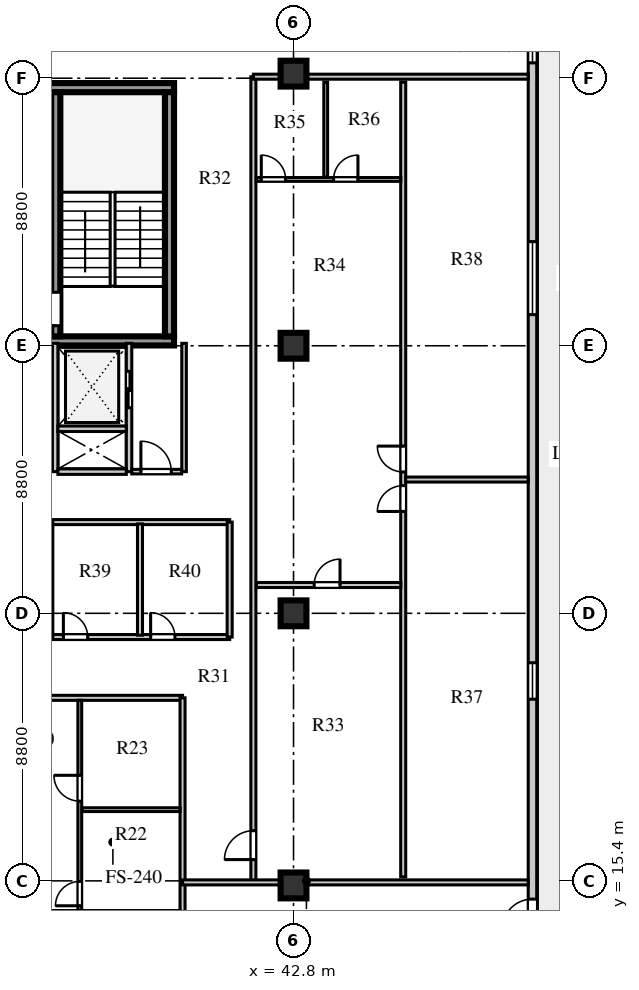
"""IFC4 building model, lengths in metres.
Left out: names, types, materials, properties, quantities, classifications, styles, units other than length and angle.
Written with IfcOpenShell. Run it as: python <this file> out.ifc"""

import sys

from ifc_helpers import new_model, si_unit, direction, frame, frame_2d, origin, origin_2d, place, context, subcontext, project, spatial, rectangle, extrude, element, fill, save


model = new_model("IFC4")
c1 = context("Model", 3, precision=1e-05, world=origin(), true_north=direction((0.0, 1.0)))
c2 = subcontext(c1, "Body", "Model", "MODEL_VIEW")
j1 = project(units=[si_unit("LENGTHUNIT", "METRE"), si_unit("PLANEANGLEUNIT", "RADIAN")], contexts=[c1])
p1 = place(None, origin())
s1 = spatial("IfcSite", under=j1, at=p1, CompositionType="ELEMENT")
p2 = place(p1, origin())
s2 = spatial("IfcBuilding", under=s1, at=p2, CompositionType="ELEMENT")
p3 = place(p2, frame((0.0, 0.0, 253.1)))
s3 = spatial("IfcBuildingStorey", under=s2, at=p3, CompositionType="ELEMENT", Elevation=253.1)
for number, where, z_axis, x_axis in (
    (1, (34.225, 33.16, 0.0), (0.0, 0.0, 1.0), (1.0, 0.0, 0.0)),
    (2, (34.225, 41.49, 0.0), (0.0, 0.0, 1.0), (1.0, 0.0, 0.0)),
):
    element("IfcWall", number, at=place(p3, frame(where, z_axis=z_axis, x_axis=x_axis)), inside=s3, PredefinedType="SHEAR", context=c2, shape_type="SweptSolid", body=[
        extrude(rectangle(XDim=4.645, YDim=0.3, at=frame_2d((2.323, 0.0))), origin(), (0.0, 0.0, 1.0), 3.66),
    ])
p4 = place(p3, frame((34.98, 33.31, 0.0), z_axis=(0.0, 0.0, 1.0), x_axis=(0.0, 1.0, 0.0)))
e3 = element("IfcWall", 3, at=p4, inside=s3, PredefinedType="SHEAR", context=c2, shape_type="SweptSolid", body=[
    extrude(rectangle(XDim=8.03, YDim=0.3, at=frame_2d((4.015, 0.0))), origin(), (0.0, 0.0, 1.0), 3.66),
])
p5 = place(p4, frame((0.35, 0.0, 0.0)))
e4 = element("IfcOpeningElement", 4, at=p5, cuts=e3, PredefinedType="OPENING", context=c2, shape_type="SweptSolid", body=[
    extrude(rectangle(XDim=1.1, YDim=2.1, at=frame_2d((0.55, 1.05))), frame((0.0, 0.16, 0.0), z_axis=(0.0, -1.0, 0.0), x_axis=(1.0, 0.0, 0.0)), (0.0, 0.0, 1.0), 0.32),
])
p6 = place(p3, frame((38.72, 33.31, 0.0), z_axis=(0.0, 0.0, 1.0), x_axis=(0.0, 1.0, 0.0)))
e5 = element("IfcWall", 5, at=p6, inside=s3, PredefinedType="SHEAR", context=c2, shape_type="SweptSolid", body=[
    extrude(rectangle(XDim=8.03, YDim=0.3, at=frame_2d((4.015, 0.0))), origin(), (0.0, 0.0, 1.0), 3.66),
])
for number, where, z_axis, x_axis in (
    (6, (42.8, 15.25, 0.0), (0.0, 0.0, 1.0), (1.0, 0.0, 0.0)),
    (7, (42.8, 24.2, 0.0), (0.0, 0.0, 1.0), (1.0, 0.0, 0.0)),
    (8, (42.8, 33.0, 0.0), (0.0, 0.0, 1.0), (1.0, 0.0, 0.0)),
    (9, (42.8, 41.95, 0.0), (0.0, 0.0, 1.0), (1.0, 0.0, 0.0)),
):
    element("IfcColumn", number, at=place(p3, frame(where, z_axis=z_axis, x_axis=x_axis)), inside=s3, PredefinedType="COLUMN", context=c2, shape_type="SweptSolid", body=[
        extrude(rectangle(XDim=0.85, YDim=0.85, at=origin_2d()), origin(), (0.0, 0.0, 1.0), 3.66),
    ])
p7 = place(p3, frame((50.66, 13.13, 0.0), z_axis=(0.0, 0.0, 1.0), x_axis=(0.0, 1.0, 0.0)))
e10 = element("IfcWall", 10, at=p7, inside=s3, PredefinedType="STANDARD", context=c2, shape_type="SweptSolid", body=[
    extrude(rectangle(XDim=30.94, YDim=0.28, at=frame_2d((15.47, 0.0))), origin(), (0.0, 0.0, 1.0), 3.66),
])
p8 = place(p7, frame((0.67, 0.0, 0.0)))
e11 = element("IfcOpeningElement", 11, at=p8, cuts=e10, PredefinedType="OPENING", context=c2, shape_type="SweptSolid", body=[
    extrude(rectangle(XDim=1.0, YDim=2.05, at=frame_2d((0.5, 1.025))), frame((0.0, 0.15, 0.0), z_axis=(0.0, -1.0, 0.0), x_axis=(1.0, 0.0, 0.0)), (0.0, 0.0, 1.0), 0.3),
])
p9 = place(p7, frame((8.245, 0.0, 0.8)))
e12 = element("IfcOpeningElement", 12, at=p9, cuts=e10, PredefinedType="OPENING", context=c2, shape_type="SweptSolid", body=[
    extrude(rectangle(XDim=1.2, YDim=1.75, at=frame_2d((0.6, 0.875))), frame((0.0, 0.15, 0.0), z_axis=(0.0, -1.0, 0.0), x_axis=(1.0, 0.0, 0.0)), (0.0, 0.0, 1.0), 0.3),
])
p10 = place(p7, frame((20.895, 0.0, 0.8)))
e13 = element("IfcOpeningElement", 13, at=p10, cuts=e10, PredefinedType="OPENING", context=c2, shape_type="SweptSolid", body=[
    extrude(rectangle(XDim=2.4, YDim=2.05, at=frame_2d((1.2, 1.025))), frame((0.0, 0.15, 0.0), z_axis=(0.0, -1.0, 0.0), x_axis=(1.0, 0.0, 0.0)), (0.0, 0.0, 1.0), 0.3),
])
p11 = place(p7, frame((29.175, 0.0, 0.8)))
e14 = element("IfcOpeningElement", 14, at=p11, cuts=e10, PredefinedType="OPENING", context=c2, shape_type="SweptSolid", body=[
    extrude(rectangle(XDim=1.2, YDim=1.75, at=frame_2d((0.6, 0.875))), frame((0.0, 0.15, 0.0), z_axis=(0.0, -1.0, 0.0), x_axis=(1.0, 0.0, 0.0)), (0.0, 0.0, 1.0), 0.3),
])
p12 = place(p3, frame((34.96, 28.86, 0.0), z_axis=(0.0, 0.0, 1.0), x_axis=(0.0, 1.0, 0.0)))
e15 = element("IfcWall", 15, at=p12, inside=s3, PredefinedType="SOLIDWALL", context=c2, shape_type="SweptSolid", body=[
    extrude(rectangle(XDim=4.22, YDim=0.18, at=frame_2d((2.11, 0.0))), origin(), (0.0, 0.0, 1.0), 3.66),
])
p13 = place(p3, frame((37.39, 28.86, 0.0), z_axis=(0.0, 0.0, 1.0), x_axis=(0.0, 1.0, 0.0)))
e16 = element("IfcWall", 16, at=p13, inside=s3, PredefinedType="SOLIDWALL", context=c2, shape_type="SweptSolid", body=[
    extrude(rectangle(XDim=4.22, YDim=0.18, at=frame_2d((2.11, 0.0))), origin(), (0.0, 0.0, 1.0), 3.66),
])
p14 = place(p13, frame((2.1, 0.0, 0.0)))
e17 = element("IfcOpeningElement", 17, at=p14, cuts=e16, PredefinedType="OPENING", context=c2, shape_type="SweptSolid", body=[
    extrude(rectangle(XDim=1.2, YDim=2.12, at=frame_2d((0.6, 1.06))), frame((0.0, 0.1, 0.0), z_axis=(0.0, -1.0, 0.0), x_axis=(1.0, 0.0, 0.0)), (0.0, 0.0, 1.0), 0.2),
])
for number, where, z_axis, x_axis in (
    (18, (35.05, 28.86, 0.0), (0.0, 0.0, 1.0), (1.0, 0.0, 0.0)),
    (19, (35.05, 30.27, 0.0), (0.0, 0.0, 1.0), (1.0, 0.0, 0.0)),
):
    element("IfcWall", number, at=place(p3, frame(where, z_axis=z_axis, x_axis=x_axis)), inside=s3, PredefinedType="SOLIDWALL", context=c2, shape_type="SweptSolid", body=[
        extrude(rectangle(XDim=2.25, YDim=0.18, at=frame_2d((1.125, 0.0))), origin(), (0.0, 0.0, 1.0), 3.66),
    ])
p15 = place(p3, frame((39.2, 28.86, 0.0), z_axis=(0.0, 0.0, 1.0), x_axis=(0.0, 1.0, 0.0)))
e20 = element("IfcWall", 20, at=p15, inside=s3, PredefinedType="PARTITIONING", context=c2, shape_type="SweptSolid", body=[
    extrude(rectangle(XDim=4.22, YDim=0.15, at=frame_2d((2.11, 0.0))), origin(), (0.0, 0.0, 1.0), 3.66),
])
p16 = place(p3, frame((37.48, 28.86, 0.0), z_axis=(0.0, 0.0, 1.0), x_axis=(1.0, 0.0, 0.0)))
e21 = element("IfcWall", 21, at=p16, inside=s3, PredefinedType="PARTITIONING", context=c2, shape_type="SweptSolid", body=[
    extrude(rectangle(XDim=1.64, YDim=0.15, at=frame_2d((0.82, 0.0))), origin(), (0.0, 0.0, 1.0), 3.66),
])
p17 = place(p16, frame((0.3, 0.0, 0.0)))
e22 = element("IfcOpeningElement", 22, at=p17, cuts=e21, PredefinedType="OPENING", context=c2, shape_type="SweptSolid", body=[
    extrude(rectangle(XDim=1.0, YDim=2.1, at=frame_2d((0.5, 1.05))), frame((0.0, 0.085, 0.0), z_axis=(0.0, -1.0, 0.0), x_axis=(1.0, 0.0, 0.0)), (0.0, 0.0, 1.0), 0.17),
])
p18 = place(p3, frame((27.08, 21.42, 0.0), z_axis=(0.0, 0.0, 1.0), x_axis=(1.0, 0.0, 0.0)))
e23 = element("IfcWall", 23, at=p18, inside=s3, PredefinedType="PARTITIONING", context=c2, shape_type="SweptSolid", body=[
    extrude(rectangle(XDim=12.07, YDim=0.165, at=frame_2d((6.035, 0.0))), origin(), (0.0, 0.0, 1.0), 3.31),
])
p19 = place(p18, frame((0.63, 0.0, 0.0)))
e24 = element("IfcOpeningElement", 24, at=p19, cuts=e23, PredefinedType="OPENING", context=c2, shape_type="SweptSolid", body=[
    extrude(rectangle(XDim=0.95, YDim=2.1, at=frame_2d((0.475, 1.05))), frame((0.0, 0.093, 0.0), z_axis=(0.0, -1.0, 0.0), x_axis=(1.0, 0.0, 0.0)), (0.0, 0.0, 1.0), 0.185),
])
p20 = place(p3, frame((39.15, 7.88, 0.0), z_axis=(0.0, 0.0, 1.0), x_axis=(0.0, 1.0, 0.0)))
e25 = element("IfcWall", 25, at=p20, inside=s3, PredefinedType="PARTITIONING", context=c2, shape_type="SweptSolid", body=[
    extrude(rectangle(XDim=13.54, YDim=0.165, at=frame_2d((6.77, 0.0))), origin(), (0.0, 0.0, 1.0), 3.66),
])
p21 = place(p3, frame((35.77, 14.421, 0.0), z_axis=(0.0, 0.0, 1.0), x_axis=(0.0, 1.0, 0.0)))
e26 = element("IfcWall", 26, at=p21, inside=s3, PredefinedType="PLUMBINGWALL", context=c2, shape_type="SweptSolid", body=[
    extrude(rectangle(XDim=6.919, YDim=0.125, at=frame_2d((3.459, 0.0))), origin(), (0.0, 0.0, 1.0), 3.66),
])
p22 = place(p21, frame((0.16, 0.0, 0.0)))
e27 = element("IfcOpeningElement", 27, at=p22, cuts=e26, PredefinedType="OPENING", context=c2, shape_type="SweptSolid", body=[
    extrude(rectangle(XDim=0.8, YDim=2.05, at=frame_2d((0.4, 1.025))), frame((0.0, 0.073, 0.0), z_axis=(0.0, -1.0, 0.0), x_axis=(1.0, 0.0, 0.0)), (0.0, 0.0, 1.0), 0.145),
])
p23 = place(p21, frame((3.601, 0.0, 0.0)))
e28 = element("IfcOpeningElement", 28, at=p23, cuts=e26, PredefinedType="OPENING", context=c2, shape_type="SweptSolid", body=[
    extrude(rectangle(XDim=0.85, YDim=2.08, at=frame_2d((0.425, 1.04))), frame((0.0, 0.073, 0.0), z_axis=(0.0, -1.0, 0.0), x_axis=(1.0, 0.0, 0.0)), (0.0, 0.0, 1.0), 0.145),
])
p24 = place(p3, frame((35.85, 17.742, 0.0), z_axis=(0.0, 0.0, 1.0), x_axis=(1.0, 0.0, 0.0)))
e29 = element("IfcWall", 29, at=p24, inside=s3, PredefinedType="PLUMBINGWALL", context=c2, shape_type="SweptSolid", body=[
    extrude(rectangle(XDim=3.22, YDim=0.125, at=frame_2d((1.61, 0.0))), origin(), (0.0, 0.0, 1.0), 3.66),
])
p25 = place(p3, frame((41.48, 15.35, 0.0), z_axis=(0.0, 0.0, 1.0), x_axis=(0.0, 1.0, 0.0)))
e30 = element("IfcWall", 30, at=p25, inside=s3, PredefinedType="PARTITIONING", context=c2, shape_type="SweptSolid", body=[
    extrude(rectangle(XDim=26.5, YDim=0.165, at=frame_2d((13.25, 0.0))), origin(), (0.0, 0.0, 1.0), 3.66),
])
p26 = place(p25, frame((0.75, 0.0, 0.0)))
e31 = element("IfcOpeningElement", 31, at=p26, cuts=e30, PredefinedType="OPENING", context=c2, shape_type="SweptSolid", body=[
    extrude(rectangle(XDim=0.95, YDim=2.1, at=frame_2d((0.475, 1.05))), frame((0.0, 0.093, 0.0), z_axis=(0.0, -1.0, 0.0), x_axis=(1.0, 0.0, 0.0)), (0.0, 0.0, 1.0), 0.185),
])
p27 = place(p3, frame((39.15, 15.35, 0.0), z_axis=(0.0, 0.0, 1.0), x_axis=(1.0, 0.0, 0.0)))
e32 = element("IfcWall", 32, at=p27, inside=s3, PredefinedType="PARTITIONING", context=c2, shape_type="SweptSolid", body=[
    extrude(rectangle(XDim=11.37, YDim=0.165, at=frame_2d((5.685, 0.0))), origin(), (0.0, 0.0, 1.0), 3.06),
])
p28 = place(p3, frame((41.48, 41.85, 0.0), z_axis=(0.0, 0.0, 1.0), x_axis=(1.0, 0.0, 0.0)))
e33 = element("IfcWall", 33, at=p28, inside=s3, PredefinedType="PARTITIONING", context=c2, shape_type="SweptSolid", body=[
    extrude(rectangle(XDim=9.04, YDim=0.165, at=frame_2d((4.52, 0.0))), origin(), (0.0, 0.0, 1.0), 3.06),
])
p29 = place(p3, frame((46.408, 15.53, 0.0), z_axis=(0.0, 0.0, 1.0), x_axis=(0.0, 1.0, 0.0)))
e34 = element("IfcWall", 34, at=p29, inside=s3, PredefinedType="PARTITIONING", context=c2, shape_type="SweptSolid", body=[
    extrude(rectangle(XDim=26.14, YDim=0.165, at=frame_2d((13.07, 0.0))), origin(), (0.0, 0.0, 1.0), 3.66),
])
p30 = place(p29, frame((12.02, 0.0, 0.0)))
e35 = element("IfcOpeningElement", 35, at=p30, cuts=e34, PredefinedType="OPENING", context=c2, shape_type="SweptSolid", body=[
    extrude(rectangle(XDim=0.85, YDim=2.08, at=frame_2d((0.425, 1.04))), frame((0.0, 0.093, 0.0), z_axis=(0.0, -1.0, 0.0), x_axis=(1.0, 0.0, 0.0)), (0.0, 0.0, 1.0), 0.185),
])
p31 = place(p29, frame((13.32, 0.0, 0.0)))
e36 = element("IfcOpeningElement", 36, at=p31, cuts=e34, PredefinedType="OPENING", context=c2, shape_type="SweptSolid", body=[
    extrude(rectangle(XDim=0.85, YDim=2.08, at=frame_2d((0.425, 1.04))), frame((0.0, 0.093, 0.0), z_axis=(0.0, -1.0, 0.0), x_axis=(1.0, 0.0, 0.0)), (0.0, 0.0, 1.0), 0.185),
])
p32 = place(p3, frame((41.58, 38.47, 0.0), z_axis=(0.0, 0.0, 1.0), x_axis=(1.0, 0.0, 0.0)))
e37 = element("IfcWall", 37, at=p32, inside=s3, PredefinedType="PLUMBINGWALL", context=c2, shape_type="SweptSolid", body=[
    extrude(rectangle(XDim=4.748, YDim=0.125, at=frame_2d((2.374, 0.0))), origin(), (0.0, 0.0, 1.0), 3.66),
])
p33 = place(p32, frame((0.16, 0.0, 0.0)))
e38 = element("IfcOpeningElement", 38, at=p33, cuts=e37, PredefinedType="OPENING", context=c2, shape_type="SweptSolid", body=[
    extrude(rectangle(XDim=0.8, YDim=2.05, at=frame_2d((0.4, 1.025))), frame((0.0, 0.073, 0.0), z_axis=(0.0, -1.0, 0.0), x_axis=(1.0, 0.0, 0.0)), (0.0, 0.0, 1.0), 0.145),
])
p34 = place(p32, frame((2.539, 0.0, 0.0)))
e39 = element("IfcOpeningElement", 39, at=p34, cuts=e37, PredefinedType="OPENING", context=c2, shape_type="SweptSolid", body=[
    extrude(rectangle(XDim=0.8, YDim=2.05, at=frame_2d((0.4, 1.025))), frame((0.0, 0.073, 0.0), z_axis=(0.0, -1.0, 0.0), x_axis=(1.0, 0.0, 0.0)), (0.0, 0.0, 1.0), 0.145),
])
p35 = place(p3, frame((43.859, 38.55, 0.0), z_axis=(0.0, 0.0, 1.0), x_axis=(0.0, 1.0, 0.0)))
e40 = element("IfcWall", 40, at=p35, inside=s3, PredefinedType="PLUMBINGWALL", context=c2, shape_type="SweptSolid", body=[
    extrude(rectangle(XDim=3.12, YDim=0.125, at=frame_2d((1.56, 0.0))), origin(), (0.0, 0.0, 1.0), 3.66),
])
p36 = place(p3, frame((41.58, 25.131, 0.0), z_axis=(0.0, 0.0, 1.0), x_axis=(1.0, 0.0, 0.0)))
e41 = element("IfcWall", 41, at=p36, inside=s3, PredefinedType="PARTITIONING", context=c2, shape_type="SweptSolid", body=[
    extrude(rectangle(XDim=4.748, YDim=0.165, at=frame_2d((2.374, 0.0))), origin(), (0.0, 0.0, 1.0), 3.66),
])
p37 = place(p36, frame((1.9, 0.0, 0.0)))
e42 = element("IfcOpeningElement", 42, at=p37, cuts=e41, PredefinedType="OPENING", context=c2, shape_type="SweptSolid", body=[
    extrude(rectangle(XDim=0.85, YDim=2.08, at=frame_2d((0.425, 1.04))), frame((0.0, 0.093, 0.0), z_axis=(0.0, -1.0, 0.0), x_axis=(1.0, 0.0, 0.0)), (0.0, 0.0, 1.0), 0.185),
])
p38 = place(p3, frame((46.488, 28.6, 0.0), z_axis=(0.0, 0.0, 1.0), x_axis=(1.0, 0.0, 0.0)))
e43 = element("IfcWall", 43, at=p38, inside=s3, PredefinedType="PARTITIONING", context=c2, shape_type="SweptSolid", body=[
    extrude(rectangle(XDim=4.032, YDim=0.165, at=frame_2d((2.016, 0.0))), origin(), (0.0, 0.0, 1.0), 3.66),
])
p39 = place(p3, frame((34.8, 23.42, 0.0), z_axis=(0.0, 0.0, 1.0), x_axis=(1.0, 0.0, 0.0)))
e44 = element("IfcWall", 44, at=p39, inside=s3, PredefinedType="PARTITIONING", context=c2, shape_type="SweptSolid", body=[
    extrude(rectangle(XDim=5.9, YDim=0.165, at=frame_2d((2.95, 0.0))), origin(), (0.0, 0.0, 1.0), 3.66),
])
p40 = place(p39, frame((0.43, 0.0, 0.0)))
e45 = element("IfcOpeningElement", 45, at=p40, cuts=e44, PredefinedType="OPENING", context=c2, shape_type="SweptSolid", body=[
    extrude(rectangle(XDim=0.8, YDim=2.05, at=frame_2d((0.4, 1.025))), frame((0.0, 0.093, 0.0), z_axis=(0.0, -1.0, 0.0), x_axis=(1.0, 0.0, 0.0)), (0.0, 0.0, 1.0), 0.185),
])
p41 = place(p39, frame((3.3, 0.0, 0.0)))
e46 = element("IfcOpeningElement", 46, at=p41, cuts=e44, PredefinedType="OPENING", context=c2, shape_type="SweptSolid", body=[
    extrude(rectangle(XDim=0.8, YDim=2.05, at=frame_2d((0.4, 1.025))), frame((0.0, 0.093, 0.0), z_axis=(0.0, -1.0, 0.0), x_axis=(1.0, 0.0, 0.0)), (0.0, 0.0, 1.0), 0.185),
])
p42 = place(p3, frame((34.8, 27.2, 0.0), z_axis=(0.0, 0.0, 1.0), x_axis=(1.0, 0.0, 0.0)))
e47 = element("IfcWall", 47, at=p42, inside=s3, PredefinedType="PARTITIONING", context=c2, shape_type="SweptSolid", body=[
    extrude(rectangle(XDim=5.9, YDim=0.165, at=frame_2d((2.95, 0.0))), origin(), (0.0, 0.0, 1.0), 3.31),
])
for number, where, z_axis, x_axis in (
    (48, (34.8, 23.42, 0.0), (0.0, 0.0, 1.0), (0.0, 1.0, 0.0)),
    (49, (40.7, 23.42, 0.0), (0.0, 0.0, 1.0), (0.0, 1.0, 0.0)),
):
    element("IfcWall", number, at=place(p3, frame(where, z_axis=z_axis, x_axis=x_axis)), inside=s3, PredefinedType="PARTITIONING", context=c2, shape_type="SweptSolid", body=[
        extrude(rectangle(XDim=3.78, YDim=0.165, at=frame_2d((1.89, 0.0))), origin(), (0.0, 0.0, 1.0), 3.66),
    ])
p43 = place(p3, frame((37.75, 23.48, 0.0), z_axis=(0.0, 0.0, 1.0), x_axis=(0.0, 1.0, 0.0)))
e50 = element("IfcWall", 50, at=p43, inside=s3, PredefinedType="PARTITIONING", context=c2, shape_type="SweptSolid", body=[
    extrude(rectangle(XDim=3.66, YDim=0.165, at=frame_2d((1.83, 0.0))), origin(), (0.0, 0.0, 1.0), 3.66),
])
p44 = place(p8, frame((1.0, 0.0, 0.0), z_axis=(0.0, 0.0, 1.0), x_axis=(-1.0, 0.0, 0.0)))
e51 = element("IfcDoor", 51, at=p44, inside=s3, OperationType="SINGLE_SWING_RIGHT", PredefinedType="DOOR", context=c2, shape_type="SweptSolid", body=[
    extrude(rectangle(XDim=1.0, YDim=2.05, at=frame_2d((0.5, 1.025))), frame((0.0, 0.025, 0.0), z_axis=(0.0, -1.0, 0.0), x_axis=(1.0, 0.0, 0.0)), (0.0, 0.0, 1.0), 0.05),
])
fill(e11, e51)
p45 = place(p9, origin())
e52 = element("IfcWindow", 52, at=p45, inside=s3, PartitioningType="SINGLE_PANEL", PredefinedType="WINDOW", context=c2, shape_type="SweptSolid", body=[
    extrude(rectangle(XDim=1.2, YDim=1.75, at=frame_2d((0.6, 0.875))), frame((0.0, 0.03, 0.0), z_axis=(0.0, -1.0, 0.0), x_axis=(1.0, 0.0, 0.0)), (0.0, 0.0, 1.0), 0.06),
])
fill(e12, e52)
p46 = place(p10, origin())
e53 = element("IfcWindow", 53, at=p46, inside=s3, PartitioningType="SINGLE_PANEL", PredefinedType="WINDOW", context=c2, shape_type="SweptSolid", body=[
    extrude(rectangle(XDim=2.4, YDim=2.05, at=frame_2d((1.2, 1.025))), frame((0.0, 0.03, 0.0), z_axis=(0.0, -1.0, 0.0), x_axis=(1.0, 0.0, 0.0)), (0.0, 0.0, 1.0), 0.06),
])
fill(e13, e53)
p47 = place(p11, origin())
e54 = element("IfcWindow", 54, at=p47, inside=s3, PartitioningType="SINGLE_PANEL", PredefinedType="WINDOW", context=c2, shape_type="SweptSolid", body=[
    extrude(rectangle(XDim=1.2, YDim=1.75, at=frame_2d((0.6, 0.875))), frame((0.0, 0.03, 0.0), z_axis=(0.0, -1.0, 0.0), x_axis=(1.0, 0.0, 0.0)), (0.0, 0.0, 1.0), 0.06),
])
fill(e14, e54)
p48 = place(p5, origin())
e55 = element("IfcDoor", 55, at=p48, inside=s3, OperationType="SINGLE_SWING_LEFT", PredefinedType="DOOR", context=c2, shape_type="SweptSolid", body=[
    extrude(rectangle(XDim=1.1, YDim=2.1, at=frame_2d((0.55, 1.05))), frame((0.0, 0.025, 0.0), z_axis=(0.0, -1.0, 0.0), x_axis=(1.0, 0.0, 0.0)), (0.0, 0.0, 1.0), 0.05),
])
fill(e4, e55)
p49 = place(p14, frame((1.2, 0.0, 0.0), z_axis=(0.0, 0.0, 1.0), x_axis=(-1.0, 0.0, 0.0)))
e56 = element("IfcDoor", 56, at=p49, inside=s3, OperationType="DOUBLE_DOOR_SLIDING", PredefinedType="DOOR", context=c2, shape_type="SweptSolid", body=[
    extrude(rectangle(XDim=1.2, YDim=2.12, at=frame_2d((0.6, 1.06))), frame((0.0, 0.025, 0.0), z_axis=(0.0, -1.0, 0.0), x_axis=(1.0, 0.0, 0.0)), (0.0, 0.0, 1.0), 0.05),
])
fill(e17, e56)
p50 = place(p17, origin())
e57 = element("IfcDoor", 57, at=p50, inside=s3, OperationType="SINGLE_SWING_LEFT", PredefinedType="DOOR", context=c2, shape_type="SweptSolid", body=[
    extrude(rectangle(XDim=1.0, YDim=2.1, at=frame_2d((0.5, 1.05))), frame((0.0, 0.025, 0.0), z_axis=(0.0, -1.0, 0.0), x_axis=(1.0, 0.0, 0.0)), (0.0, 0.0, 1.0), 0.05),
])
fill(e22, e57)
p51 = place(p22, origin())
e58 = element("IfcDoor", 58, at=p51, inside=s3, OperationType="SINGLE_SWING_LEFT", PredefinedType="DOOR", context=c2, shape_type="SweptSolid", body=[
    extrude(rectangle(XDim=0.8, YDim=2.05, at=frame_2d((0.4, 1.025))), frame((0.0, 0.025, 0.0), z_axis=(0.0, -1.0, 0.0), x_axis=(1.0, 0.0, 0.0)), (0.0, 0.0, 1.0), 0.05),
])
fill(e27, e58)
p52 = place(p23, origin())
e59 = element("IfcDoor", 59, at=p52, inside=s3, OperationType="SINGLE_SWING_RIGHT", PredefinedType="DOOR", context=c2, shape_type="SweptSolid", body=[
    extrude(rectangle(XDim=0.85, YDim=2.08, at=frame_2d((0.425, 1.04))), frame((0.0, 0.025, 0.0), z_axis=(0.0, -1.0, 0.0), x_axis=(1.0, 0.0, 0.0)), (0.0, 0.0, 1.0), 0.05),
])
fill(e28, e59)
p53 = place(p37, frame((0.85, 0.0, 0.0), z_axis=(0.0, 0.0, 1.0), x_axis=(-1.0, 0.0, 0.0)))
e60 = element("IfcDoor", 60, at=p53, inside=s3, OperationType="SINGLE_SWING_LEFT", PredefinedType="DOOR", context=c2, shape_type="SweptSolid", body=[
    extrude(rectangle(XDim=0.85, YDim=2.08, at=frame_2d((0.425, 1.04))), frame((0.0, 0.025, 0.0), z_axis=(0.0, -1.0, 0.0), x_axis=(1.0, 0.0, 0.0)), (0.0, 0.0, 1.0), 0.05),
])
fill(e42, e60)
p54 = place(p33, origin())
e61 = element("IfcDoor", 61, at=p54, inside=s3, OperationType="SINGLE_SWING_LEFT", PredefinedType="DOOR", context=c2, shape_type="SweptSolid", body=[
    extrude(rectangle(XDim=0.8, YDim=2.05, at=frame_2d((0.4, 1.025))), frame((0.0, 0.025, 0.0), z_axis=(0.0, -1.0, 0.0), x_axis=(1.0, 0.0, 0.0)), (0.0, 0.0, 1.0), 0.05),
])
fill(e38, e61)
p55 = place(p34, origin())
e62 = element("IfcDoor", 62, at=p55, inside=s3, OperationType="SINGLE_SWING_RIGHT", PredefinedType="DOOR", context=c2, shape_type="SweptSolid", body=[
    extrude(rectangle(XDim=0.8, YDim=2.05, at=frame_2d((0.4, 1.025))), frame((0.0, 0.025, 0.0), z_axis=(0.0, -1.0, 0.0), x_axis=(1.0, 0.0, 0.0)), (0.0, 0.0, 1.0), 0.05),
])
fill(e39, e62)
p56 = place(p30, origin())
e63 = element("IfcDoor", 63, at=p56, inside=s3, OperationType="SINGLE_SWING_LEFT", PredefinedType="DOOR", context=c2, shape_type="SweptSolid", body=[
    extrude(rectangle(XDim=0.85, YDim=2.08, at=frame_2d((0.425, 1.04))), frame((0.0, 0.025, 0.0), z_axis=(0.0, -1.0, 0.0), x_axis=(1.0, 0.0, 0.0)), (0.0, 0.0, 1.0), 0.05),
])
fill(e35, e63)
p57 = place(p31, origin())
e64 = element("IfcDoor", 64, at=p57, inside=s3, OperationType="SINGLE_SWING_RIGHT", PredefinedType="DOOR", context=c2, shape_type="SweptSolid", body=[
    extrude(rectangle(XDim=0.85, YDim=2.08, at=frame_2d((0.425, 1.04))), frame((0.0, 0.025, 0.0), z_axis=(0.0, -1.0, 0.0), x_axis=(1.0, 0.0, 0.0)), (0.0, 0.0, 1.0), 0.05),
])
fill(e36, e64)
p58 = place(p26, origin())
e65 = element("IfcDoor", 65, at=p58, inside=s3, OperationType="SINGLE_SWING_LEFT", PredefinedType="DOOR", context=c2, shape_type="SweptSolid", body=[
    extrude(rectangle(XDim=0.95, YDim=2.1, at=frame_2d((0.475, 1.05))), frame((0.0, 0.025, 0.0), z_axis=(0.0, -1.0, 0.0), x_axis=(1.0, 0.0, 0.0)), (0.0, 0.0, 1.0), 0.05),
])
fill(e31, e65)
p59 = place(p40, origin())
e66 = element("IfcDoor", 66, at=p59, inside=s3, OperationType="SINGLE_SWING_LEFT", PredefinedType="DOOR", context=c2, shape_type="SweptSolid", body=[
    extrude(rectangle(XDim=0.8, YDim=2.05, at=frame_2d((0.4, 1.025))), frame((0.0, 0.025, 0.0), z_axis=(0.0, -1.0, 0.0), x_axis=(1.0, 0.0, 0.0)), (0.0, 0.0, 1.0), 0.05),
])
fill(e45, e66)
p60 = place(p41, origin())
e67 = element("IfcDoor", 67, at=p60, inside=s3, OperationType="SINGLE_SWING_LEFT", PredefinedType="DOOR", context=c2, shape_type="SweptSolid", body=[
    extrude(rectangle(XDim=0.8, YDim=2.05, at=frame_2d((0.4, 1.025))), frame((0.0, 0.025, 0.0), z_axis=(0.0, -1.0, 0.0), x_axis=(1.0, 0.0, 0.0)), (0.0, 0.0, 1.0), 0.05),
])
fill(e46, e67)
save(model, sys.argv[1])
